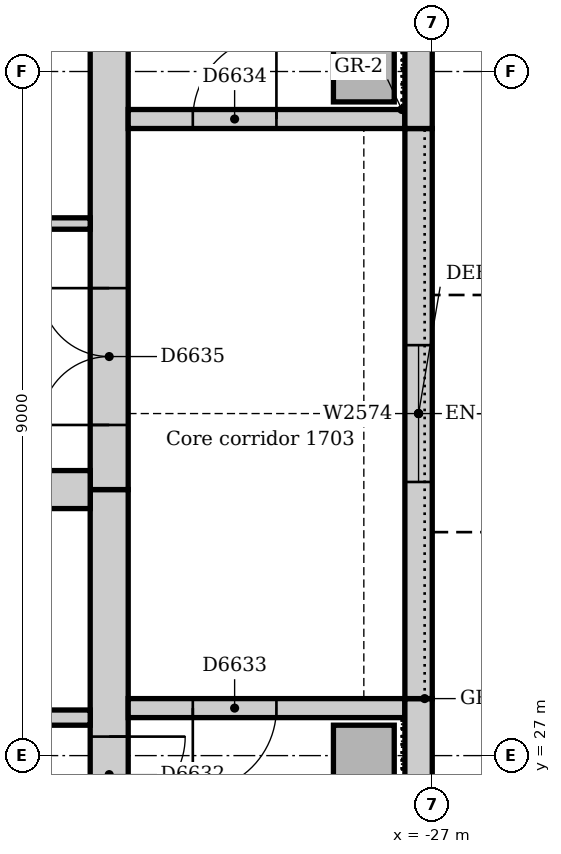
"""IFC4 building model, lengths in metres.
Left out: names, types, materials, properties, quantities, classifications, styles, units other than length and angle.
Written with IfcOpenShell. Run it as: python <this file> out.ifc"""

import sys

from ifc_helpers import new_model, si_unit, direction, frame, frame_2d, origin, origin_2d, place, context, subcontext, project, spatial, rectangle, extrude, element, fill, save


model = new_model("IFC4")
c1 = context("Model", 3, precision=1e-05, world=origin(), true_north=direction((0.0, 1.0)))
c2 = subcontext(c1, "Body", "Model", "MODEL_VIEW")
j1 = project(units=[si_unit("LENGTHUNIT", "METRE"), si_unit("PLANEANGLEUNIT", "RADIAN")], contexts=[c1])
p1 = place(None, origin())
s1 = spatial("IfcSite", under=j1, at=p1, CompositionType="ELEMENT")
p2 = place(p1, origin())
s2 = spatial("IfcBuilding", under=s1, at=p2, CompositionType="ELEMENT")
p3 = place(p2, frame((0.0, 0.0, 75.0)))
s3 = spatial("IfcBuildingStorey", under=s2, at=p3, CompositionType="ELEMENT", Elevation=75.0)
p4 = place(p3, frame((-31.25, 21.0, 0.0), z_axis=(0.0, 0.0, 1.0), x_axis=(0.0, 1.0, 0.0)))
e1 = element("IfcWall", 1, at=p4, inside=s3, PredefinedType="SOLIDWALL", context=c2, shape_type="SweptSolid", body=[
    extrude(rectangle(XDim=9.5, YDim=0.5, at=frame_2d((4.75, 0.0))), origin(), (0.0, 0.0, 1.0), 4.0),
])
p5 = place(p4, frame((5.25, 0.0, 0.0)))
e2 = element("IfcOpeningElement", 2, at=p5, cuts=e1, PredefinedType="OPENING", context=c2, shape_type="SweptSolid", body=[
    extrude(rectangle(XDim=1.0, YDim=2.1, at=frame_2d((0.5, 1.05))), frame((0.0, 0.26, 0.0), z_axis=(0.0, -1.0, 0.0), x_axis=(1.0, 0.0, 0.0)), (0.0, 0.0, 1.0), 0.52),
])
p6 = place(p3, frame((-31.25, 30.5, 0.0), z_axis=(0.0, 0.0, 1.0), x_axis=(0.0, 1.0, 0.0)))
e3 = element("IfcWall", 3, at=p6, inside=s3, PredefinedType="SOLIDWALL", context=c2, shape_type="SweptSolid", body=[
    extrude(rectangle(XDim=11.5, YDim=0.5, at=frame_2d((5.75, 0.0))), origin(), (0.0, 0.0, 1.0), 4.0),
])
p7 = place(p6, frame((0.85, 0.0, 0.0)))
e4 = element("IfcOpeningElement", 4, at=p7, cuts=e3, PredefinedType="OPENING", context=c2, shape_type="SweptSolid", body=[
    extrude(rectangle(XDim=1.8, YDim=2.1, at=frame_2d((0.9, 1.05))), frame((0.0, 0.26, 0.0), z_axis=(0.0, -1.0, 0.0), x_axis=(1.0, 0.0, 0.0)), (0.0, 0.0, 1.0), 0.52),
])
p8 = place(p3, frame((-42.0, 30.5, 0.0), z_axis=(0.0, 0.0, 1.0), x_axis=(1.0, 0.0, 0.0)))
e5 = element("IfcWall", 5, at=p8, inside=s3, PredefinedType="SOLIDWALL", context=c2, shape_type="SweptSolid", body=[
    extrude(rectangle(XDim=10.5, YDim=0.5, at=frame_2d((5.25, 0.0))), origin(), (0.0, 0.0, 1.0), 4.0),
])
p9 = place(p3, frame((-27.36, 27.625, 0.0), z_axis=(0.0, 0.0, 1.0), x_axis=(-1.0, 0.0, 0.0)))
e6 = element("IfcWall", 6, at=p9, inside=s3, PredefinedType="SOLIDWALL", context=c2, shape_type="SweptSolid", body=[
    extrude(rectangle(XDim=3.64, YDim=0.25, at=frame_2d((1.82, 0.0))), origin(), (0.0, 0.0, 1.0), 4.0),
])
p10 = place(p9, frame((1.69, 0.0, 0.0)))
e7 = element("IfcOpeningElement", 7, at=p10, cuts=e6, PredefinedType="OPENING", context=c2, shape_type="SweptSolid", body=[
    extrude(rectangle(XDim=1.1, YDim=2.1, at=frame_2d((0.55, 1.05))), frame((0.0, 0.135, 0.0), z_axis=(0.0, -1.0, 0.0), x_axis=(1.0, 0.0, 0.0)), (0.0, 0.0, 1.0), 0.27),
])
p11 = place(p3, frame((-31.0, 35.375, 0.0), z_axis=(0.0, 0.0, 1.0), x_axis=(1.0, 0.0, 0.0)))
e8 = element("IfcWall", 8, at=p11, inside=s3, PredefinedType="SOLIDWALL", context=c2, shape_type="SweptSolid", body=[
    extrude(rectangle(XDim=3.64, YDim=0.25, at=frame_2d((1.82, 0.0))), origin(), (0.0, 0.0, 1.0), 4.0),
])
p12 = place(p11, frame((0.85, 0.0, 0.0)))
e9 = element("IfcOpeningElement", 9, at=p12, cuts=e8, PredefinedType="OPENING", context=c2, shape_type="SweptSolid", body=[
    extrude(rectangle(XDim=1.1, YDim=2.1, at=frame_2d((0.55, 1.05))), frame((0.0, 0.135, 0.0), z_axis=(0.0, -1.0, 0.0), x_axis=(1.0, 0.0, 0.0)), (0.0, 0.0, 1.0), 0.27),
])
for number, where, z_axis, x_axis in (
    (10, (-27.9, 27.0, 0.0), (0.0, 0.0, 1.0), (1.0, 0.0, 0.0)),
    (11, (-27.9, 36.0, 0.0), (0.0, 0.0, 1.0), (1.0, 0.0, 0.0)),
):
    element("IfcColumn", number, at=place(p3, frame(where, z_axis=z_axis, x_axis=x_axis)), inside=s3, PredefinedType="COLUMN", context=c2, shape_type="SweptSolid", body=[
        extrude(rectangle(XDim=0.8, YDim=0.8, at=origin_2d()), origin(), (0.0, 0.0, 1.0), 4.0),
    ])
p13 = place(p3, frame((-27.18, 21.0, 0.0), z_axis=(0.0, 0.0, 1.0), x_axis=(0.0, 1.0, 0.0)))
e12 = element("IfcWall", 12, at=p13, inside=s3, PredefinedType="STANDARD", context=c2, shape_type="SweptSolid", body=[
    extrude(rectangle(XDim=6.75, YDim=0.36, at=frame_2d((3.375, 0.0))), origin(), (0.0, 0.0, 1.0), 3.85),
])
p14 = place(p3, frame((-27.18, 27.75, 0.0), z_axis=(0.0, 0.0, 1.0), x_axis=(0.0, 1.0, 0.0)))
e13 = element("IfcWall", 13, at=p14, inside=s3, PredefinedType="STANDARD", context=c2, shape_type="SweptSolid", body=[
    extrude(rectangle(XDim=7.5, YDim=0.36, at=frame_2d((3.75, 0.0))), origin(), (0.0, 0.0, 1.0), 3.85),
])
p15 = place(p14, frame((2.85, 0.0, 1.2)))
e14 = element("IfcOpeningElement", 14, at=p15, cuts=e13, PredefinedType="OPENING", context=c2, shape_type="SweptSolid", body=[
    extrude(rectangle(XDim=1.8, YDim=1.2, at=frame_2d((0.9, 0.6))), frame((0.0, 0.19, 0.0), z_axis=(0.0, -1.0, 0.0), x_axis=(1.0, 0.0, 0.0)), (0.0, 0.0, 1.0), 0.38),
])
p16 = place(p3, frame((-27.18, 35.25, 0.0), z_axis=(0.0, 0.0, 1.0), x_axis=(0.0, 1.0, 0.0)))
e15 = element("IfcWall", 15, at=p16, inside=s3, PredefinedType="STANDARD", context=c2, shape_type="SweptSolid", body=[
    extrude(rectangle(XDim=6.75, YDim=0.36, at=frame_2d((3.375, 0.0))), origin(), (0.0, 0.0, 1.0), 3.85),
])
p17 = place(p3, frame((-34.9, 27.5, 0.0), z_axis=(0.0, 0.0, 1.0), x_axis=(1.0, 0.0, 0.0)))
e16 = element("IfcWall", 16, at=p17, inside=s3, PredefinedType="SOLIDWALL", context=c2, shape_type="SweptSolid", body=[
    extrude(rectangle(XDim=3.4, YDim=0.2, at=frame_2d((1.7, 0.0))), origin(), (0.0, 0.0, 1.0), 4.0),
])
p18 = place(p17, frame((1.1, 0.0, 0.0)))
e17 = element("IfcOpeningElement", 17, at=p18, cuts=e16, PredefinedType="OPENING", context=c2, shape_type="SweptSolid", body=[
    extrude(rectangle(XDim=1.1, YDim=2.1, at=frame_2d((0.55, 1.05))), frame((0.0, 0.11, 0.0), z_axis=(0.0, -1.0, 0.0), x_axis=(1.0, 0.0, 0.0)), (0.0, 0.0, 1.0), 0.22),
])
p19 = place(p3, frame((-34.075, 34.0, 0.0), z_axis=(0.0, 0.0, 1.0), x_axis=(1.0, 0.0, 0.0)))
e18 = element("IfcWall", 18, at=p19, inside=s3, PredefinedType="SOLIDWALL", context=c2, shape_type="SweptSolid", body=[
    extrude(rectangle(XDim=2.575, YDim=0.15, at=frame_2d((1.288, 0.0))), origin(), (0.0, 0.0, 1.0), 4.0),
])
p20 = place(p15, origin())
e19 = element("IfcWindow", 19, at=p20, inside=s3, PartitioningType="SINGLE_PANEL", PredefinedType="WINDOW", context=c2, shape_type="SweptSolid", body=[
    extrude(rectangle(XDim=1.8, YDim=1.2, at=frame_2d((0.9, 0.6))), frame((0.0, 0.13, 0.0), z_axis=(0.0, -1.0, 0.0), x_axis=(1.0, 0.0, 0.0)), (0.0, 0.0, 1.0), 0.06),
])
fill(e14, e19)
p21 = place(p5, frame((1.0, 0.0, 0.0), z_axis=(0.0, 0.0, 1.0), x_axis=(-1.0, 0.0, 0.0)))
e20 = element("IfcDoor", 20, at=p21, inside=s3, OperationType="SINGLE_SWING_LEFT", PredefinedType="DOOR", context=c2, shape_type="SweptSolid", body=[
    extrude(rectangle(XDim=1.0, YDim=2.1, at=frame_2d((0.5, 1.05))), frame((0.0, 0.025, 0.0), z_axis=(0.0, -1.0, 0.0), x_axis=(1.0, 0.0, 0.0)), (0.0, 0.0, 1.0), 0.05),
])
fill(e2, e20)
p22 = place(p10, origin())
e21 = element("IfcDoor", 21, at=p22, inside=s3, OperationType="SINGLE_SWING_RIGHT", PredefinedType="DOOR", context=c2, shape_type="SweptSolid", body=[
    extrude(rectangle(XDim=1.1, YDim=2.1, at=frame_2d((0.55, 1.05))), frame((0.0, 0.025, 0.0), z_axis=(0.0, -1.0, 0.0), x_axis=(1.0, 0.0, 0.0)), (0.0, 0.0, 1.0), 0.05),
])
fill(e7, e21)
p23 = place(p12, origin())
e22 = element("IfcDoor", 22, at=p23, inside=s3, OperationType="SINGLE_SWING_RIGHT", PredefinedType="DOOR", context=c2, shape_type="SweptSolid", body=[
    extrude(rectangle(XDim=1.1, YDim=2.1, at=frame_2d((0.55, 1.05))), frame((0.0, 0.025, 0.0), z_axis=(0.0, -1.0, 0.0), x_axis=(1.0, 0.0, 0.0)), (0.0, 0.0, 1.0), 0.05),
])
fill(e9, e22)
p24 = place(p7, origin())
e23 = element("IfcDoor", 23, at=p24, inside=s3, OperationType="DOUBLE_DOOR_SINGLE_SWING", PredefinedType="DOOR", context=c2, shape_type="SweptSolid", body=[
    extrude(rectangle(XDim=1.8, YDim=2.1, at=frame_2d((0.9, 1.05))), frame((0.0, 0.025, 0.0), z_axis=(0.0, -1.0, 0.0), x_axis=(1.0, 0.0, 0.0)), (0.0, 0.0, 1.0), 0.05),
])
fill(e4, e23)
save(model, sys.argv[1])
